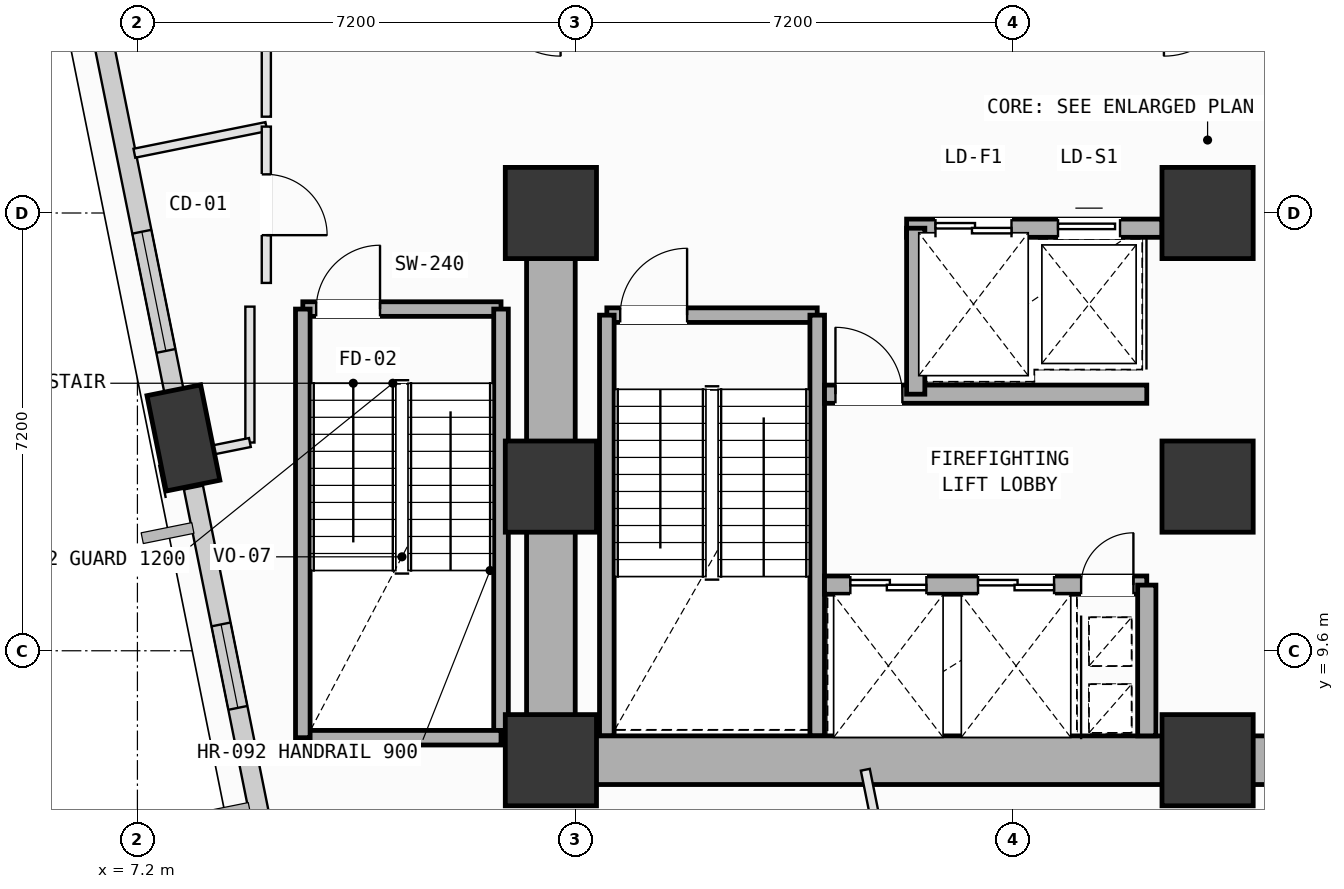
"""IFC4 building model, lengths in metres.
Left out: names, types, materials, properties, quantities, classifications, styles, units other than length and angle.
Written with IfcOpenShell. Run it as: python <this file> out.ifc"""

import sys

from ifc_helpers import new_model, si_unit, direction, frame, frame_2d, origin, origin_2d, place, context, subcontext, project, spatial, rectangle, extrude, element, fill, save


model = new_model("IFC4")
c1 = context("Model", 3, precision=1e-05, world=origin(), true_north=direction((0.0, 1.0)))
c2 = subcontext(c1, "Body", "Model", "MODEL_VIEW")
j1 = project(units=[si_unit("LENGTHUNIT", "METRE"), si_unit("PLANEANGLEUNIT", "RADIAN")], contexts=[c1])
p1 = place(None, origin())
s1 = spatial("IfcSite", under=j1, at=p1, CompositionType="ELEMENT")
p2 = place(p1, origin())
s2 = spatial("IfcBuilding", under=s1, at=p2, CompositionType="ELEMENT")
p3 = place(p2, frame((0.0, 0.0, 71.0)))
s3 = spatial("IfcBuildingStorey", under=s2, at=p3, CompositionType="ELEMENT", Elevation=71.0)
for number, where, z_axis, x_axis in (
    (1, (14.0, 7.8, 0.0), (0.0, 0.0, 1.0), (1.0, 0.0, 0.0)),
    (2, (14.0, 12.3, 0.0), (0.0, 0.0, 1.0), (1.0, 0.0, 0.0)),
    (3, (14.0, 16.8, 0.0), (0.0, 0.0, 1.0), (1.0, 0.0, 0.0)),
    (4, (24.8, 7.8, 0.0), (0.0, 0.0, 1.0), (1.0, 0.0, 0.0)),
    (5, (24.8, 12.3, 0.0), (0.0, 0.0, 1.0), (1.0, 0.0, 0.0)),
    (6, (24.8, 16.8, 0.0), (0.0, 0.0, 1.0), (1.0, 0.0, 0.0)),
):
    element("IfcColumn", number, at=place(p3, frame(where, z_axis=z_axis, x_axis=x_axis)), inside=s3, PredefinedType="COLUMN", context=c2, shape_type="SweptSolid", body=[
        extrude(rectangle(XDim=1.5, YDim=1.5, at=origin_2d()), origin(), (0.0, 0.0, 1.0), 4.0),
    ])
p4 = place(p3, frame((7.957, 13.1, 0.002), z_axis=(0.049085805426, -0.105149197532, 0.993244295208), x_axis=(-0.590956568441, 0.798643005727, 0.113752730165)))
e7 = element("IfcColumn", 7, at=p4, inside=s3, PredefinedType="COLUMN", context=c2, shape_type="SweptSolid", body=[
    extrude(rectangle(XDim=1.6, YDim=0.9, at=origin_2d()), origin(), (0.0, 0.0, 1.0), 4.024),
])
p5 = place(p3, frame((7.882, 13.471, 0.0), z_axis=(0.0, 0.0, 1.0), x_axis=(-0.197675150803, 0.980267583242, 0.0)))
e8 = element("IfcWall", 8, at=p5, inside=s3, PredefinedType="SOLIDWALL", context=c2, shape_type="SweptSolid", body=[
    extrude(rectangle(XDim=7.136, YDim=0.32, at=frame_2d((3.568, 0.0))), origin(), (0.0, 0.0, 1.0), 3.165),
])
p6 = place(p5, frame((1.081, 0.0, 0.75)))
e9 = element("IfcOpeningElement", 9, at=p6, cuts=e8, PredefinedType="OPENING", context=c2, shape_type="SweptSolid", body=[
    extrude(rectangle(XDim=2.0, YDim=1.95, at=frame_2d((1.0, 0.975))), frame((0.0, 0.17, 0.0), z_axis=(0.0, -1.0, 0.0), x_axis=(1.0, 0.0, 0.0)), (0.0, 0.0, 1.0), 0.34),
])
p7 = place(p3, frame((9.306, 6.406, 0.0), z_axis=(0.0, 0.0, 1.0), x_axis=(-0.19765037467, 0.980272579129, 0.0)))
e10 = element("IfcWall", 10, at=p7, inside=s3, PredefinedType="SOLIDWALL", context=c2, shape_type="SweptSolid", body=[
    extrude(rectangle(XDim=5.997, YDim=0.32, at=frame_2d((2.999, 0.0))), origin(), (0.0, 0.0, 1.0), 3.165),
])
p8 = place(p7, frame((2.3, 0.0, 0.75)))
e11 = element("IfcOpeningElement", 11, at=p8, cuts=e10, PredefinedType="OPENING", context=c2, shape_type="SweptSolid", body=[
    extrude(rectangle(XDim=1.4, YDim=1.85, at=frame_2d((0.7, 0.925))), frame((0.0, 0.17, 0.0), z_axis=(0.0, -1.0, 0.0), x_axis=(1.0, 0.0, 0.0)), (0.0, 0.0, 1.0), 0.34),
])
p9 = place(p3, frame((14.92, 15.12, 0.0), z_axis=(0.0, 0.0, 1.0), x_axis=(1.0, 0.0, 0.0)))
e12 = element("IfcWall", 12, at=p9, inside=s3, PredefinedType="SOLIDWALL", context=c2, shape_type="SweptSolid", body=[
    extrude(rectangle(XDim=3.46, YDim=0.24, at=frame_2d((1.73, 0.0))), origin(), (0.0, 0.0, 1.0), 3.78),
])
p10 = place(p9, frame((0.22, 0.0, 0.0)))
e13 = element("IfcOpeningElement", 13, at=p10, cuts=e12, PredefinedType="OPENING", context=c2, shape_type="SweptSolid", body=[
    extrude(rectangle(XDim=1.1, YDim=2.15, at=frame_2d((0.55, 1.075))), frame((0.0, 0.13, 0.0), z_axis=(0.0, -1.0, 0.0), x_axis=(1.0, 0.0, 0.0)), (0.0, 0.0, 1.0), 0.26),
])
for number, where, z_axis, x_axis in (
    (14, (18.38, 15.12, 0.0), (0.0, 0.0, 1.0), (0.0, -1.0, 0.0)),
    (15, (14.92, 8.2, 0.0), (0.0, 0.0, 1.0), (0.0, 1.0, 0.0)),
):
    element("IfcWall", number, at=place(p3, frame(where, z_axis=z_axis, x_axis=x_axis)), inside=s3, PredefinedType="SOLIDWALL", context=c2, shape_type="SweptSolid", body=[
        extrude(rectangle(XDim=6.92, YDim=0.24, at=frame_2d((3.46, 0.0))), origin(), (0.0, 0.0, 1.0), 3.78),
    ])
p11 = place(p3, frame((9.92, 15.22, 0.0), z_axis=(0.0, 0.0, 1.0), x_axis=(1.0, 0.0, 0.0)))
e16 = element("IfcWall", 16, at=p11, inside=s3, PredefinedType="SOLIDWALL", context=c2, shape_type="SweptSolid", body=[
    extrude(rectangle(XDim=3.26, YDim=0.24, at=frame_2d((1.63, 0.0))), origin(), (0.0, 0.0, 1.0), 3.78),
])
p12 = place(p11, frame((0.22, 0.0, 0.0)))
e17 = element("IfcOpeningElement", 17, at=p12, cuts=e16, PredefinedType="OPENING", context=c2, shape_type="SweptSolid", body=[
    extrude(rectangle(XDim=1.05, YDim=2.15, at=frame_2d((0.525, 1.075))), frame((0.0, 0.13, 0.0), z_axis=(0.0, -1.0, 0.0), x_axis=(1.0, 0.0, 0.0)), (0.0, 0.0, 1.0), 0.26),
])
p13 = place(p3, frame((13.18, 15.22, 0.0), z_axis=(0.0, 0.0, 1.0), x_axis=(0.0, -1.0, 0.0)))
e18 = element("IfcWall", 18, at=p13, inside=s3, PredefinedType="SOLIDWALL", context=c2, shape_type="SweptSolid", body=[
    extrude(rectangle(XDim=7.05, YDim=0.24, at=frame_2d((3.525, 0.0))), origin(), (0.0, 0.0, 1.0), 3.78),
])
p14 = place(p3, frame((13.18, 8.17, 0.0), z_axis=(0.0, 0.0, 1.0), x_axis=(-1.0, 0.0, 0.0)))
e19 = element("IfcWall", 19, at=p14, inside=s3, PredefinedType="SOLIDWALL", context=c2, shape_type="SweptSolid", body=[
    extrude(rectangle(XDim=3.26, YDim=0.24, at=frame_2d((1.63, 0.0))), origin(), (0.0, 0.0, 1.0), 3.78),
])
p15 = place(p3, frame((9.92, 8.17, 0.0), z_axis=(0.0, 0.0, 1.0), x_axis=(0.0, 1.0, 0.0)))
e20 = element("IfcWall", 20, at=p15, inside=s3, PredefinedType="SOLIDWALL", context=c2, shape_type="SweptSolid", body=[
    extrude(rectangle(XDim=7.05, YDim=0.24, at=frame_2d((3.525, 0.0))), origin(), (0.0, 0.0, 1.0), 3.78),
])
for number, where, z_axis, x_axis in (
    (21, (14.0, 7.8, 0.0), (0.0, 0.0, 1.0), (1.0, 0.0, 0.0)),
    (22, (24.8, 7.8, 0.0), (0.0, 0.0, 1.0), (1.0, 0.0, 0.0)),
):
    element("IfcWall", number, at=place(p3, frame(where, z_axis=z_axis, x_axis=x_axis)), inside=s3, PredefinedType="SHEAR", context=c2, shape_type="SweptSolid", body=[
        extrude(rectangle(XDim=10.8, YDim=0.8, at=frame_2d((5.4, 0.0))), origin(), (0.0, 0.0, 1.0), 3.78),
    ])
p16 = place(p3, frame((14.0, 16.8, 0.0), z_axis=(0.0, 0.0, 1.0), x_axis=(0.0, -1.0, 0.0)))
e23 = element("IfcWall", 23, at=p16, inside=s3, PredefinedType="SHEAR", context=c2, shape_type="SweptSolid", body=[
    extrude(rectangle(XDim=9.0, YDim=0.8, at=frame_2d((4.5, 0.0))), origin(), (0.0, 0.0, 1.0), 3.78),
])
p17 = place(p3, frame((19.85, 16.55, 0.0), z_axis=(0.0, 0.0, 1.0), x_axis=(1.0, 0.0, 0.0)))
e24 = element("IfcWall", 24, at=p17, inside=s3, PredefinedType="SOLIDWALL", context=c2, shape_type="SweptSolid", body=[
    extrude(rectangle(XDim=4.2, YDim=0.3, at=frame_2d((2.1, 0.0))), origin(), (0.0, 0.0, 1.0), 3.78),
])
p18 = place(p17, frame((0.475, 0.0, 0.0)))
e25 = element("IfcOpeningElement", 25, at=p18, cuts=e24, PredefinedType="OPENING", context=c2, shape_type="SweptSolid", body=[
    extrude(rectangle(XDim=1.25, YDim=2.18, at=frame_2d((0.625, 1.09))), frame((0.0, 0.16, 0.0), z_axis=(0.0, -1.0, 0.0), x_axis=(1.0, 0.0, 0.0)), (0.0, 0.0, 1.0), 0.32),
])
p19 = place(p17, frame((2.49, 0.0, 0.0)))
e26 = element("IfcOpeningElement", 26, at=p19, cuts=e24, PredefinedType="OPENING", context=c2, shape_type="SweptSolid", body=[
    extrude(rectangle(XDim=1.02, YDim=2.12, at=frame_2d((0.51, 1.06))), frame((0.0, 0.16, 0.0), z_axis=(0.0, -1.0, 0.0), x_axis=(1.0, 0.0, 0.0)), (0.0, 0.0, 1.0), 0.32),
])
p20 = place(p3, frame((18.5, 10.68, 0.0), z_axis=(0.0, 0.0, 1.0), x_axis=(1.0, 0.0, 0.0)))
e27 = element("IfcWall", 27, at=p20, inside=s3, PredefinedType="SOLIDWALL", context=c2, shape_type="SweptSolid", body=[
    extrude(rectangle(XDim=5.3, YDim=0.3, at=frame_2d((2.65, 0.0))), origin(), (0.0, 0.0, 1.0), 3.78),
])
p21 = place(p20, frame((4.22, 0.0, 0.0)))
e28 = element("IfcOpeningElement", 28, at=p21, cuts=e27, PredefinedType="OPENING", context=c2, shape_type="SweptSolid", body=[
    extrude(rectangle(XDim=0.86, YDim=2.06, at=frame_2d((0.43, 1.03))), frame((0.0, 0.16, 0.0), z_axis=(0.0, -1.0, 0.0), x_axis=(1.0, 0.0, 0.0)), (0.0, 0.0, 1.0), 0.32),
])
p22 = place(p20, frame((0.425, 0.0, 0.0)))
e29 = element("IfcOpeningElement", 29, at=p22, cuts=e27, PredefinedType="OPENING", context=c2, shape_type="SweptSolid", body=[
    extrude(rectangle(XDim=1.25, YDim=2.18, at=frame_2d((0.625, 1.09))), frame((0.0, 0.16, 0.0), z_axis=(0.0, -1.0, 0.0), x_axis=(1.0, 0.0, 0.0)), (0.0, 0.0, 1.0), 0.32),
])
p23 = place(p20, frame((2.525, 0.0, 0.0)))
e30 = element("IfcOpeningElement", 30, at=p23, cuts=e27, PredefinedType="OPENING", context=c2, shape_type="SweptSolid", body=[
    extrude(rectangle(XDim=1.25, YDim=2.18, at=frame_2d((0.625, 1.09))), frame((0.0, 0.16, 0.0), z_axis=(0.0, -1.0, 0.0), x_axis=(1.0, 0.0, 0.0)), (0.0, 0.0, 1.0), 0.32),
])
p24 = place(p3, frame((18.5, 13.82, 0.0), z_axis=(0.0, 0.0, 1.0), x_axis=(1.0, 0.0, 0.0)))
e31 = element("IfcWall", 31, at=p24, inside=s3, PredefinedType="SOLIDWALL", context=c2, shape_type="SweptSolid", body=[
    extrude(rectangle(XDim=5.3, YDim=0.3, at=frame_2d((2.65, 0.0))), origin(), (0.0, 0.0, 1.0), 3.78),
])
p25 = place(p24, frame((0.18, 0.0, 0.0)))
e32 = element("IfcOpeningElement", 32, at=p25, cuts=e31, PredefinedType="OPENING", context=c2, shape_type="SweptSolid", body=[
    extrude(rectangle(XDim=1.1, YDim=2.15, at=frame_2d((0.55, 1.075))), frame((0.0, 0.16, 0.0), z_axis=(0.0, -1.0, 0.0), x_axis=(1.0, 0.0, 0.0)), (0.0, 0.0, 1.0), 0.32),
])
p26 = place(p3, frame((23.8, 8.2, 0.0), z_axis=(0.0, 0.0, 1.0), x_axis=(0.0, 1.0, 0.0)))
e33 = element("IfcWall", 33, at=p26, inside=s3, PredefinedType="SOLIDWALL", context=c2, shape_type="SweptSolid", body=[
    extrude(rectangle(XDim=2.48, YDim=0.3, at=frame_2d((1.24, 0.0))), origin(), (0.0, 0.0, 1.0), 3.78),
])
p27 = place(p3, frame((20.0, 13.82, 0.0), z_axis=(0.0, 0.0, 1.0), x_axis=(0.0, 1.0, 0.0)))
e34 = element("IfcWall", 34, at=p27, inside=s3, PredefinedType="SOLIDWALL", context=c2, shape_type="SweptSolid", body=[
    extrude(rectangle(XDim=2.73, YDim=0.3, at=frame_2d((1.365, 0.0))), origin(), (0.0, 0.0, 1.0), 3.78),
])
p28 = place(p3, frame((19.171, 7.643, 0.0), z_axis=(0.0, 0.0, 1.0), x_axis=(0.197713770803, -0.980259794562, 0.0)))
e35 = element("IfcWall", 35, at=p28, inside=s3, PredefinedType="PARTITIONING", context=c2, shape_type="SweptSolid", body=[
    extrude(rectangle(XDim=8.168, YDim=0.15, at=frame_2d((4.084, 0.0))), origin(), (0.0, 0.0, 1.0), 3.78),
])
p29 = place(p3, frame((9.05, 15.26, 0.0), z_axis=(0.0, 0.0, 1.0), x_axis=(0.0, -1.0, 0.0)))
e36 = element("IfcWall", 36, at=p29, inside=s3, PredefinedType="PARTITIONING", context=c2, shape_type="SweptSolid", body=[
    extrude(rectangle(XDim=2.235, YDim=0.15, at=frame_2d((1.118, 0.0))), origin(), (0.0, 0.0, 1.0), 3.78),
])
p30 = place(p3, frame((9.05, 13.025, 0.0), z_axis=(0.0, 0.0, 1.0), x_axis=(-0.98035389044, -0.197246671708, 0.0)))
e37 = element("IfcWall", 37, at=p30, inside=s3, PredefinedType="PARTITIONING", context=c2, shape_type="SweptSolid", body=[
    extrude(rectangle(XDim=1.287, YDim=0.15, at=frame_2d((0.644, 0.0))), origin(), (0.0, 0.0, 1.0), 3.78),
])
p31 = place(p3, frame((7.788, 12.771, 0.0), z_axis=(0.0, 0.0, 1.0), x_axis=(-0.197661660172, 0.980270303589, 0.0)))
e38 = element("IfcWall", 38, at=p31, inside=s3, PredefinedType="PARTITIONING", context=c2, shape_type="SweptSolid", body=[
    extrude(rectangle(XDim=0.668, YDim=0.15, at=frame_2d((0.334, 0.0))), origin(), (0.0, 0.0, 1.0), 3.165),
])
p32 = place(p3, frame((7.15, 17.783, 0.0), z_axis=(0.0, 0.0, 1.0), x_axis=(0.980235621704, 0.197833581431, 0.0)))
e39 = element("IfcWall", 39, at=p32, inside=s3, PredefinedType="PARTITIONING", context=c2, shape_type="SweptSolid", body=[
    extrude(rectangle(XDim=2.214, YDim=0.15, at=frame_2d((1.107, 0.0))), origin(), (0.0, 0.0, 1.0), 3.78),
])
p33 = place(p3, frame((9.32, 18.221, 0.0), z_axis=(0.0, 0.0, 1.0), x_axis=(0.0, -1.0, 0.0)))
e40 = element("IfcWall", 40, at=p33, inside=s3, PredefinedType="PARTITIONING", context=c2, shape_type="SweptSolid", body=[
    extrude(rectangle(XDim=2.571, YDim=0.15, at=frame_2d((1.286, 0.0))), origin(), (0.0, 0.0, 1.0), 3.78),
])
p34 = place(p33, frame((0.785, 0.0, 0.0)))
e41 = element("IfcOpeningElement", 41, at=p34, cuts=e40, PredefinedType="OPENING", context=c2, shape_type="SweptSolid", body=[
    extrude(rectangle(XDim=1.0, YDim=2.12, at=frame_2d((0.5, 1.06))), frame((0.0, 0.085, 0.0), z_axis=(0.0, -1.0, 0.0), x_axis=(1.0, 0.0, 0.0)), (0.0, 0.0, 1.0), 0.17),
])
p35 = place(p3, frame((9.32, 20.55, 0.0), z_axis=(0.0, 0.0, 1.0), x_axis=(0.0, -1.0, 0.0)))
e42 = element("IfcWall", 42, at=p35, inside=s3, PredefinedType="PARTITIONING", context=c2, shape_type="SweptSolid", body=[
    extrude(rectangle(XDim=2.166, YDim=0.15, at=frame_2d((1.083, 0.0))), origin(), (0.0, 0.0, 1.0), 3.78),
])
p36 = place(p6, origin())
e43 = element("IfcWindow", 43, at=p36, inside=s3, PartitioningType="SINGLE_PANEL", PredefinedType="WINDOW", context=c2, shape_type="SweptSolid", body=[
    extrude(rectangle(XDim=2.0, YDim=1.95, at=frame_2d((1.0, 0.975))), frame((0.0, 0.03, 0.0), z_axis=(0.0, -1.0, 0.0), x_axis=(1.0, 0.0, 0.0)), (0.0, 0.0, 1.0), 0.06),
])
fill(e9, e43)
p37 = place(p8, origin())
e44 = element("IfcWindow", 44, at=p37, inside=s3, PartitioningType="SINGLE_PANEL", PredefinedType="WINDOW", context=c2, shape_type="SweptSolid", body=[
    extrude(rectangle(XDim=1.4, YDim=1.85, at=frame_2d((0.7, 0.925))), frame((0.0, 0.03, 0.0), z_axis=(0.0, -1.0, 0.0), x_axis=(1.0, 0.0, 0.0)), (0.0, 0.0, 1.0), 0.06),
])
fill(e11, e44)
p38 = place(p10, origin())
e45 = element("IfcDoor", 45, at=p38, inside=s3, OperationType="SINGLE_SWING_RIGHT", PredefinedType="DOOR", context=c2, shape_type="SweptSolid", body=[
    extrude(rectangle(XDim=1.1, YDim=2.15, at=frame_2d((0.55, 1.075))), frame((0.0, 0.025, 0.0), z_axis=(0.0, -1.0, 0.0), x_axis=(1.0, 0.0, 0.0)), (0.0, 0.0, 1.0), 0.05),
])
fill(e13, e45)
p39 = place(p12, origin())
e46 = element("IfcDoor", 46, at=p39, inside=s3, OperationType="SINGLE_SWING_RIGHT", PredefinedType="DOOR", context=c2, shape_type="SweptSolid", body=[
    extrude(rectangle(XDim=1.05, YDim=2.15, at=frame_2d((0.525, 1.075))), frame((0.0, 0.025, 0.0), z_axis=(0.0, -1.0, 0.0), x_axis=(1.0, 0.0, 0.0)), (0.0, 0.0, 1.0), 0.05),
])
fill(e17, e46)
p40 = place(p21, origin())
e47 = element("IfcDoor", 47, at=p40, inside=s3, OperationType="SINGLE_SWING_RIGHT", PredefinedType="DOOR", context=c2, shape_type="SweptSolid", body=[
    extrude(rectangle(XDim=0.86, YDim=2.06, at=frame_2d((0.43, 1.03))), frame((0.0, 0.025, 0.0), z_axis=(0.0, -1.0, 0.0), x_axis=(1.0, 0.0, 0.0)), (0.0, 0.0, 1.0), 0.05),
])
fill(e28, e47)
p41 = place(p25, origin())
e48 = element("IfcDoor", 48, at=p41, inside=s3, OperationType="SINGLE_SWING_LEFT", PredefinedType="DOOR", context=c2, shape_type="SweptSolid", body=[
    extrude(rectangle(XDim=1.1, YDim=2.15, at=frame_2d((0.55, 1.075))), frame((0.0, 0.025, 0.0), z_axis=(0.0, -1.0, 0.0), x_axis=(1.0, 0.0, 0.0)), (0.0, 0.0, 1.0), 0.05),
])
fill(e32, e48)
p42 = place(p22, origin())
e49 = element("IfcDoor", 49, at=p42, inside=s3, OperationType="DOUBLE_DOOR_SLIDING", PredefinedType="DOOR", context=c2, shape_type="SweptSolid", body=[
    extrude(rectangle(XDim=1.25, YDim=2.18, at=frame_2d((0.625, 1.09))), frame((0.0, 0.025, 0.0), z_axis=(0.0, -1.0, 0.0), x_axis=(1.0, 0.0, 0.0)), (0.0, 0.0, 1.0), 0.05),
])
fill(e29, e49)
p43 = place(p23, origin())
e50 = element("IfcDoor", 50, at=p43, inside=s3, OperationType="DOUBLE_DOOR_SLIDING", PredefinedType="DOOR", context=c2, shape_type="SweptSolid", body=[
    extrude(rectangle(XDim=1.25, YDim=2.18, at=frame_2d((0.625, 1.09))), frame((0.0, 0.025, 0.0), z_axis=(0.0, -1.0, 0.0), x_axis=(1.0, 0.0, 0.0)), (0.0, 0.0, 1.0), 0.05),
])
fill(e30, e50)
p44 = place(p18, origin())
e51 = element("IfcDoor", 51, at=p44, inside=s3, OperationType="DOUBLE_DOOR_SLIDING", PredefinedType="DOOR", context=c2, shape_type="SweptSolid", body=[
    extrude(rectangle(XDim=1.25, YDim=2.18, at=frame_2d((0.625, 1.09))), frame((0.0, 0.025, 0.0), z_axis=(0.0, -1.0, 0.0), x_axis=(1.0, 0.0, 0.0)), (0.0, 0.0, 1.0), 0.05),
])
fill(e25, e51)
p45 = place(p19, origin())
e52 = element("IfcDoor", 52, at=p45, inside=s3, OperationType="SLIDING_TO_LEFT", PredefinedType="DOOR", context=c2, shape_type="SweptSolid", body=[
    extrude(rectangle(XDim=1.02, YDim=2.12, at=frame_2d((0.51, 1.06))), frame((0.0, 0.025, 0.0), z_axis=(0.0, -1.0, 0.0), x_axis=(1.0, 0.0, 0.0)), (0.0, 0.0, 1.0), 0.05),
])
fill(e26, e52)
p46 = place(p34, origin())
e53 = element("IfcDoor", 53, at=p46, inside=s3, OperationType="SINGLE_SWING_RIGHT", PredefinedType="DOOR", context=c2, shape_type="SweptSolid", body=[
    extrude(rectangle(XDim=1.0, YDim=2.12, at=frame_2d((0.5, 1.06))), frame((0.0, 0.025, 0.0), z_axis=(0.0, -1.0, 0.0), x_axis=(1.0, 0.0, 0.0)), (0.0, 0.0, 1.0), 0.05),
])
fill(e41, e53)
save(model, sys.argv[1])
